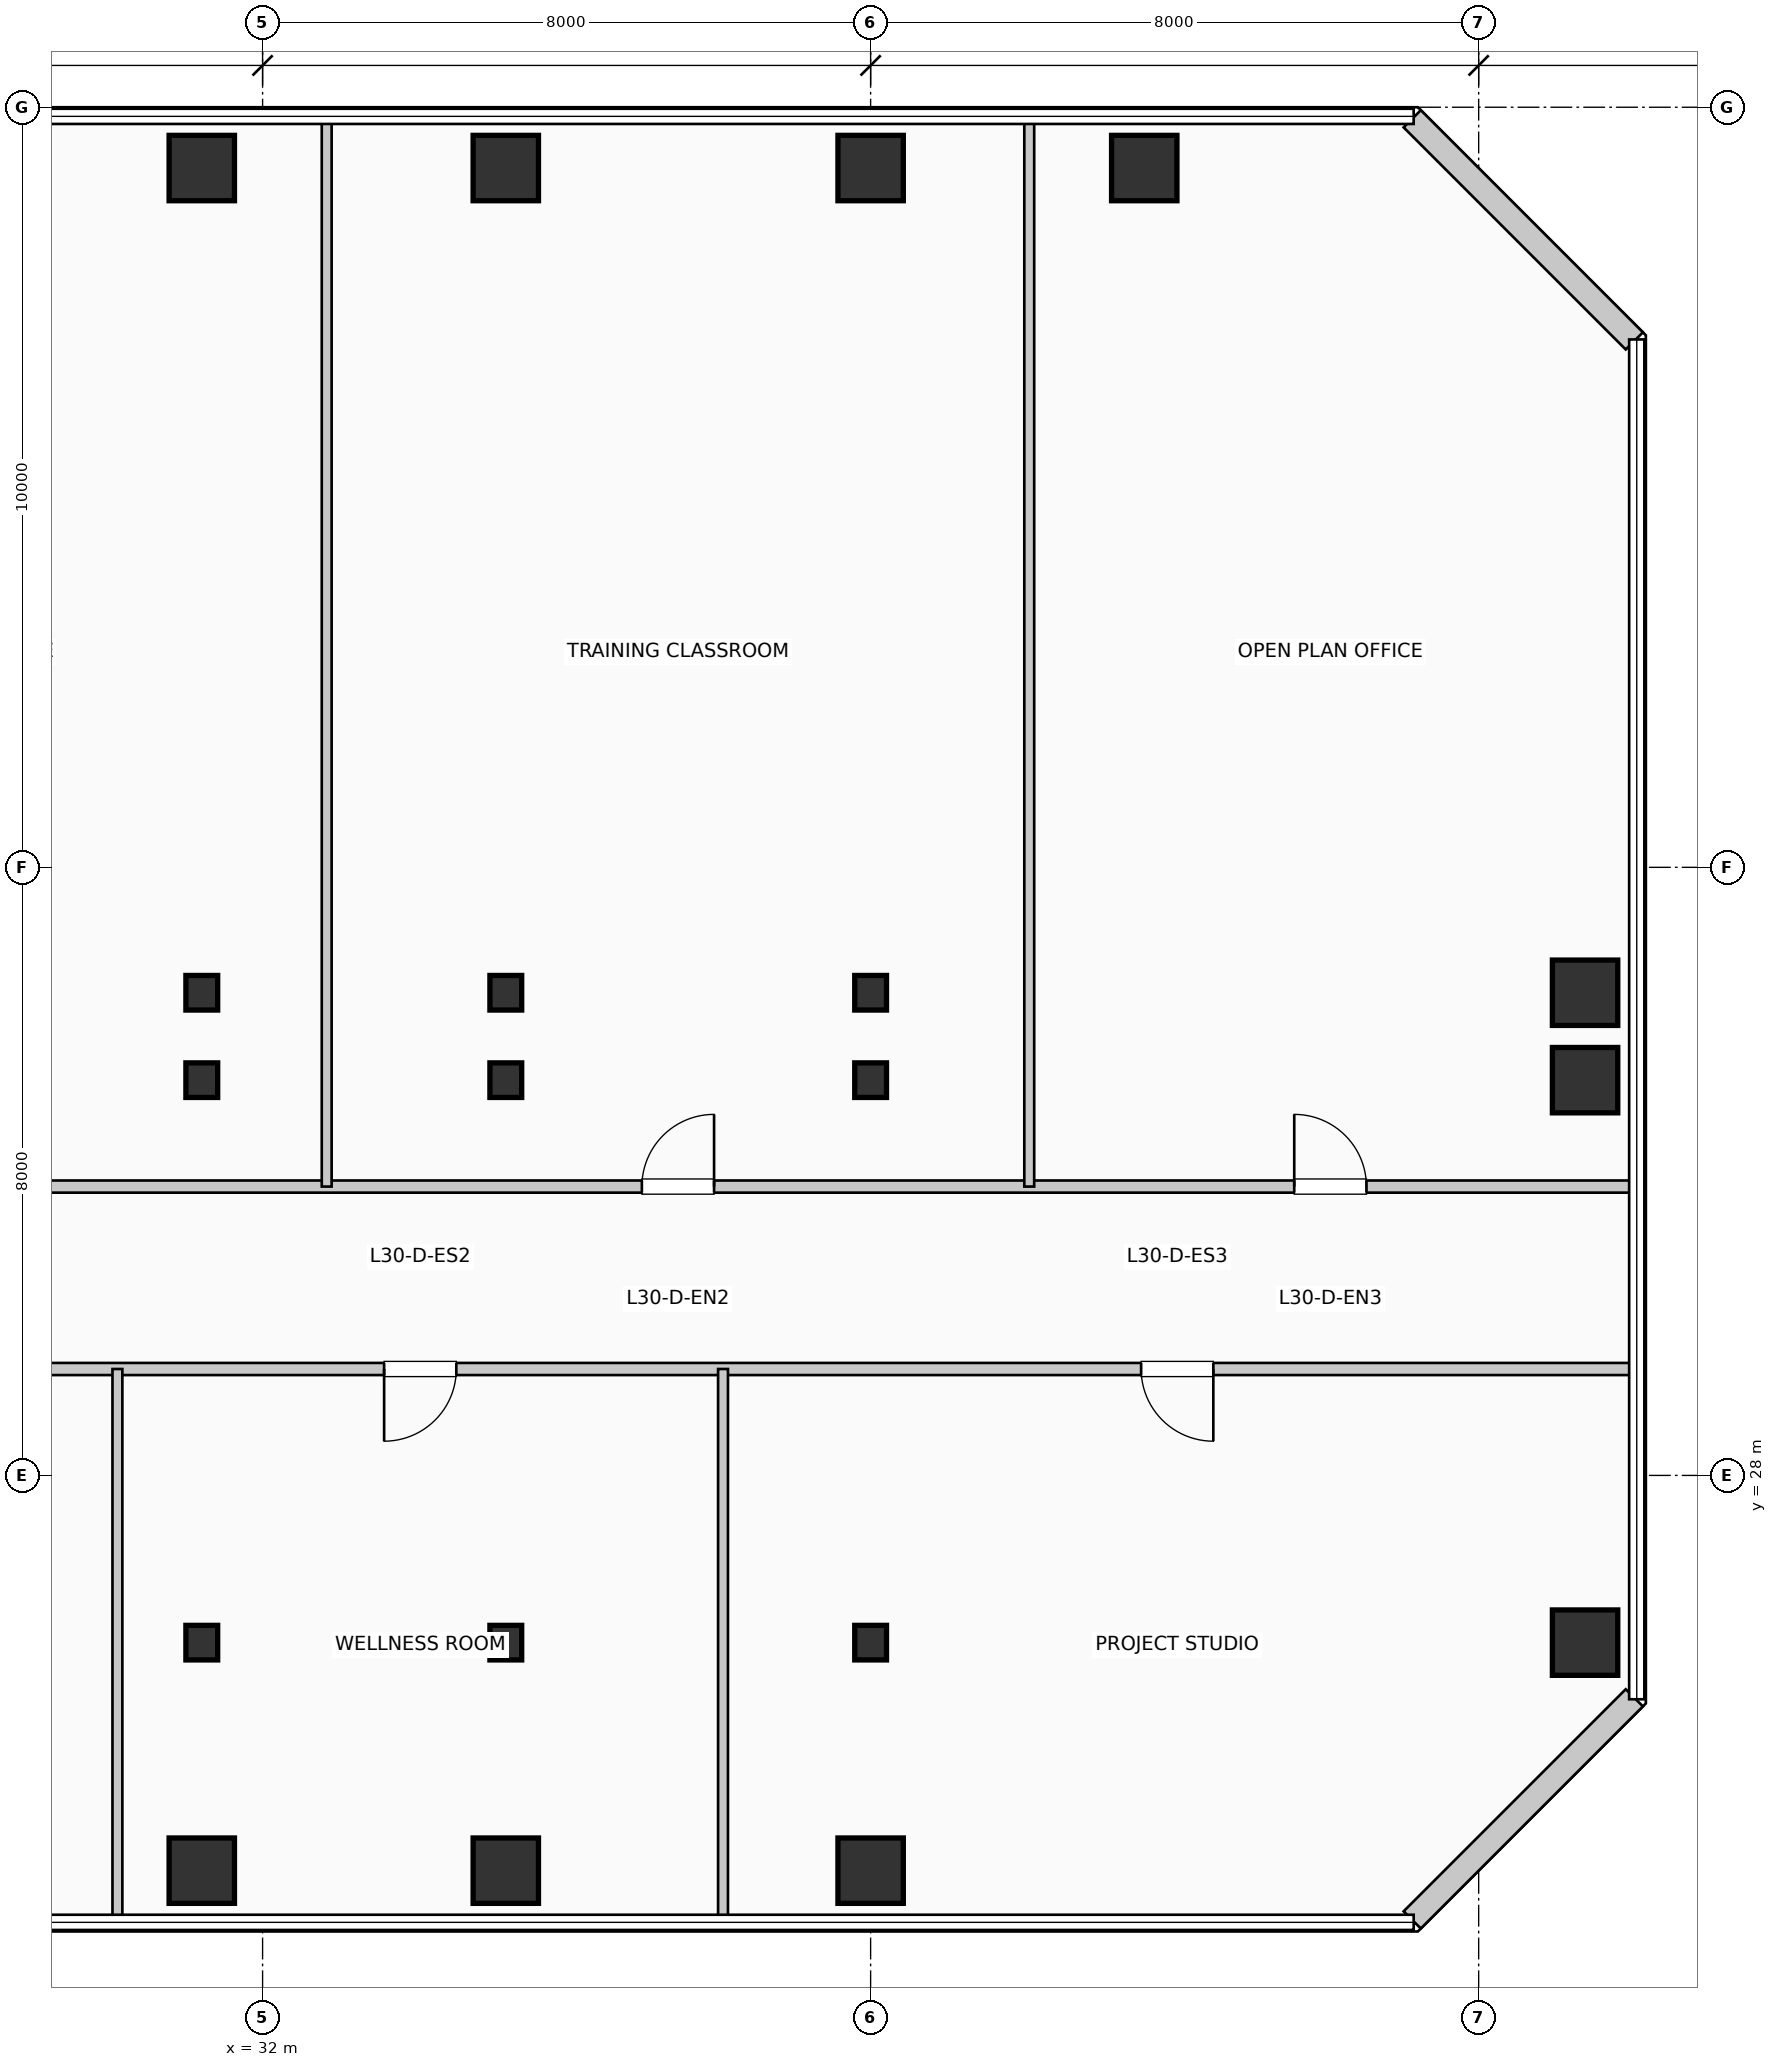
"""IFC4 building model, lengths in metres.
Left out: names, types, materials, properties, quantities, classifications, styles, units other than length and angle.
Written with IfcOpenShell. Run it as: python <this file> out.ifc"""

import sys

from ifc_helpers import new_model, si_unit, direction, frame, frame_2d, origin, origin_2d, place, context, subcontext, project, spatial, rectangle, i_section, extrude, element, fill, save


model = new_model("IFC4")
c1 = context("Model", 3, precision=1e-05, world=origin(), true_north=direction((0.0, 1.0)))
c2 = subcontext(c1, "Body", "Model", "MODEL_VIEW")
j1 = project(units=[si_unit("LENGTHUNIT", "METRE"), si_unit("PLANEANGLEUNIT", "RADIAN")], contexts=[c1])
p1 = place(None, origin())
s1 = spatial("IfcSite", under=j1, at=p1, CompositionType="ELEMENT")
p2 = place(p1, origin())
s2 = spatial("IfcBuilding", under=s1, at=p2, CompositionType="ELEMENT")
p3 = place(p2, frame((0.0, 0.0, 126.39)))
s3 = spatial("IfcBuildingStorey", under=s2, at=p3, CompositionType="ELEMENT", Elevation=126.39)
p4 = place(p3, frame((31.2, 22.8, 0.0), z_axis=(0.0, 0.0, 1.0), x_axis=(1.0, 0.0, 0.0)))
e1 = element("IfcColumn", 1, at=p4, inside=s3, PredefinedType="COLUMN", context=c2, shape_type="SweptSolid", body=[
    extrude(rectangle(XDim=0.86, YDim=0.86, at=origin_2d()), origin(), (0.0, 0.0, 1.0), 3.96),
])
for number, where, z_axis, x_axis in (
    (2, (31.2, 25.8, 0.0), (0.0, 0.0, 1.0), (1.0, 0.0, 0.0)),
    (3, (31.2, 33.2, 0.0), (0.0, 0.0, 1.0), (1.0, 0.0, 0.0)),
    (4, (31.2, 34.35, 0.0), (0.0, 0.0, 1.0), (1.0, 0.0, 0.0)),
):
    element("IfcColumn", number, at=place(p3, frame(where, z_axis=z_axis, x_axis=x_axis)), inside=s3, PredefinedType="COLUMN", context=c2, shape_type="SweptSolid", body=[
        extrude(i_section(OverallWidth=0.418, OverallDepth=0.455, WebThickness=0.032, FlangeThickness=0.051, at=origin_2d()), origin(), (0.0, 0.0, 1.0), 3.96),
    ])
for number, where, z_axis, x_axis in (
    (5, (31.2, 45.2, 0.0), (0.0, 0.0, 1.0), (1.0, 0.0, 0.0)),
    (6, (35.2, 22.8, 0.0), (0.0, 0.0, 1.0), (1.0, 0.0, 0.0)),
):
    element("IfcColumn", number, at=place(p3, frame(where, z_axis=z_axis, x_axis=x_axis)), inside=s3, PredefinedType="COLUMN", context=c2, shape_type="SweptSolid", body=[
        extrude(rectangle(XDim=0.86, YDim=0.86, at=origin_2d()), origin(), (0.0, 0.0, 1.0), 3.96),
    ])
for number, where, z_axis, x_axis in (
    (7, (35.2, 25.8, 0.0), (0.0, 0.0, 1.0), (1.0, 0.0, 0.0)),
    (8, (35.2, 33.2, 0.0), (0.0, 0.0, 1.0), (1.0, 0.0, 0.0)),
    (9, (35.2, 34.35, 0.0), (0.0, 0.0, 1.0), (1.0, 0.0, 0.0)),
):
    element("IfcColumn", number, at=place(p3, frame(where, z_axis=z_axis, x_axis=x_axis)), inside=s3, PredefinedType="COLUMN", context=c2, shape_type="SweptSolid", body=[
        extrude(i_section(OverallWidth=0.418, OverallDepth=0.455, WebThickness=0.032, FlangeThickness=0.051, at=origin_2d()), origin(), (0.0, 0.0, 1.0), 3.96),
    ])
for number, where, z_axis, x_axis in (
    (10, (35.2, 45.2, 0.0), (0.0, 0.0, 1.0), (1.0, 0.0, 0.0)),
    (11, (40.0, 22.8, 0.0), (0.0, 0.0, 1.0), (1.0, 0.0, 0.0)),
):
    element("IfcColumn", number, at=place(p3, frame(where, z_axis=z_axis, x_axis=x_axis)), inside=s3, PredefinedType="COLUMN", context=c2, shape_type="SweptSolid", body=[
        extrude(rectangle(XDim=0.86, YDim=0.86, at=origin_2d()), origin(), (0.0, 0.0, 1.0), 3.96),
    ])
for number, where, z_axis, x_axis in (
    (12, (40.0, 25.8, 0.0), (0.0, 0.0, 1.0), (1.0, 0.0, 0.0)),
    (13, (40.0, 33.2, 0.0), (0.0, 0.0, 1.0), (1.0, 0.0, 0.0)),
    (14, (40.0, 34.35, 0.0), (0.0, 0.0, 1.0), (1.0, 0.0, 0.0)),
):
    element("IfcColumn", number, at=place(p3, frame(where, z_axis=z_axis, x_axis=x_axis)), inside=s3, PredefinedType="COLUMN", context=c2, shape_type="SweptSolid", body=[
        extrude(i_section(OverallWidth=0.418, OverallDepth=0.455, WebThickness=0.032, FlangeThickness=0.051, at=origin_2d()), origin(), (0.0, 0.0, 1.0), 3.96),
    ])
for number, where, z_axis, x_axis in (
    (15, (40.0, 45.2, 0.0), (0.0, 0.0, 1.0), (1.0, 0.0, 0.0)),
    (16, (43.6, 45.2, 0.0), (0.0, 0.0, 1.0), (1.0, 0.0, 0.0)),
    (17, (49.4, 25.8, 0.0), (0.0, 0.0, 1.0), (1.0, 0.0, 0.0)),
    (18, (49.4, 33.2, 0.0), (0.0, 0.0, 1.0), (1.0, 0.0, 0.0)),
    (19, (49.4, 34.35, 0.0), (0.0, 0.0, 1.0), (1.0, 0.0, 0.0)),
):
    element("IfcColumn", number, at=place(p3, frame(where, z_axis=z_axis, x_axis=x_axis)), inside=s3, PredefinedType="COLUMN", context=c2, shape_type="SweptSolid", body=[
        extrude(rectangle(XDim=0.86, YDim=0.86, at=origin_2d()), origin(), (0.0, 0.0, 1.0), 3.96),
    ])
for number, where, z_axis, x_axis in (
    (20, (47.126, 22.152, 0.0), (0.0, 0.0, 1.0), (0.707, 0.707, 0.0)),
    (21, (50.048, 42.926, 0.0), (0.0, 0.0, 1.0), (-0.707, 0.707, 0.0)),
):
    element("IfcWall", number, at=place(p3, frame(where, z_axis=z_axis, x_axis=x_axis)), inside=s3, PredefinedType="SOLIDWALL", context=c2, shape_type="SweptSolid", body=[
        extrude(rectangle(XDim=4.133, YDim=0.32, at=frame_2d((2.066, 0.0))), origin(), (0.0, 0.0, 1.0), 3.71),
    ])
p5 = place(p3, frame((23.45, 29.4, 0.0), z_axis=(0.0, 0.0, 1.0), x_axis=(1.0, 0.0, 0.0)))
e22 = element("IfcWall", 22, at=p5, inside=s3, PredefinedType="PARTITIONING", context=c2, shape_type="SweptSolid", body=[
    extrude(rectangle(XDim=26.56, YDim=0.16, at=frame_2d((13.28, 0.0))), origin(), (0.0, 0.0, 1.0), 3.365),
])
p6 = place(p5, frame((3.795, 0.0, 0.0), z_axis=(0.0, 0.0, 1.0), x_axis=(-1.0, 0.0, 0.0)))
e23 = element("IfcOpeningElement", 23, at=p6, cuts=e22, PredefinedType="OPENING", context=c2, shape_type="SweptSolid", body=[
    extrude(rectangle(XDim=0.95, YDim=2.15, at=frame_2d((0.475, 1.075))), frame((0.0, 0.09, 0.0), z_axis=(0.0, -1.0, 0.0), x_axis=(1.0, 0.0, 0.0)), (0.0, 0.0, 1.0), 0.18),
])
p7 = place(p5, frame((11.099, 0.0, 0.0), z_axis=(0.0, 0.0, 1.0), x_axis=(-1.0, 0.0, 0.0)))
e24 = element("IfcOpeningElement", 24, at=p7, cuts=e22, PredefinedType="OPENING", context=c2, shape_type="SweptSolid", body=[
    extrude(rectangle(XDim=0.95, YDim=2.15, at=frame_2d((0.475, 1.075))), frame((0.0, 0.09, 0.0), z_axis=(0.0, -1.0, 0.0), x_axis=(1.0, 0.0, 0.0)), (0.0, 0.0, 1.0), 0.18),
])
p8 = place(p5, frame((21.059, 0.0, 0.0), z_axis=(0.0, 0.0, 1.0), x_axis=(-1.0, 0.0, 0.0)))
e25 = element("IfcOpeningElement", 25, at=p8, cuts=e22, PredefinedType="OPENING", context=c2, shape_type="SweptSolid", body=[
    extrude(rectangle(XDim=0.95, YDim=2.15, at=frame_2d((0.475, 1.075))), frame((0.0, 0.09, 0.0), z_axis=(0.0, -1.0, 0.0), x_axis=(1.0, 0.0, 0.0)), (0.0, 0.0, 1.0), 0.18),
])
p9 = place(p3, frame((23.6, 31.8, 0.0), z_axis=(0.0, 0.0, 1.0), x_axis=(1.0, 0.0, 0.0)))
e26 = element("IfcWall", 26, at=p9, inside=s3, PredefinedType="PARTITIONING", context=c2, shape_type="SweptSolid", body=[
    extrude(rectangle(XDim=26.41, YDim=0.16, at=frame_2d((13.205, 0.0))), origin(), (0.0, 0.0, 1.0), 3.71),
])
p10 = place(p9, frame((4.147, 0.0, 0.0)))
e27 = element("IfcOpeningElement", 27, at=p10, cuts=e26, PredefinedType="OPENING", context=c2, shape_type="SweptSolid", body=[
    extrude(rectangle(XDim=0.95, YDim=2.15, at=frame_2d((0.475, 1.075))), frame((0.0, 0.09, 0.0), z_axis=(0.0, -1.0, 0.0), x_axis=(1.0, 0.0, 0.0)), (0.0, 0.0, 1.0), 0.18),
])
p11 = place(p9, frame((13.39, 0.0, 0.0)))
e28 = element("IfcOpeningElement", 28, at=p11, cuts=e26, PredefinedType="OPENING", context=c2, shape_type="SweptSolid", body=[
    extrude(rectangle(XDim=0.95, YDim=2.15, at=frame_2d((0.475, 1.075))), frame((0.0, 0.09, 0.0), z_axis=(0.0, -1.0, 0.0), x_axis=(1.0, 0.0, 0.0)), (0.0, 0.0, 1.0), 0.18),
])
p12 = place(p9, frame((21.973, 0.0, 0.0)))
e29 = element("IfcOpeningElement", 29, at=p12, cuts=e26, PredefinedType="OPENING", context=c2, shape_type="SweptSolid", body=[
    extrude(rectangle(XDim=0.95, YDim=2.15, at=frame_2d((0.475, 1.075))), frame((0.0, 0.09, 0.0), z_axis=(0.0, -1.0, 0.0), x_axis=(1.0, 0.0, 0.0)), (0.0, 0.0, 1.0), 0.18),
])
for number, where, z_axis, x_axis in (
    (30, (30.09, 22.19, 0.0), (0.0, 0.0, 1.0), (0.0, 1.0, 0.0)),
    (31, (38.058, 22.19, 0.0), (0.0, 0.0, 1.0), (0.0, 1.0, 0.0)),
):
    element("IfcWall", number, at=place(p3, frame(where, z_axis=z_axis, x_axis=x_axis)), inside=s3, PredefinedType="PARTITIONING", context=c2, shape_type="SweptSolid", body=[
        extrude(rectangle(XDim=7.21, YDim=0.13, at=frame_2d((3.605, 0.0))), origin(), (0.0, 0.0, 1.0), 3.71),
    ])
for number, where, z_axis, x_axis in (
    (32, (32.844, 31.8, 0.0), (0.0, 0.0, 1.0), (0.0, 1.0, 0.0)),
    (33, (42.087, 31.8, 0.0), (0.0, 0.0, 1.0), (0.0, 1.0, 0.0)),
):
    element("IfcWall", number, at=place(p3, frame(where, z_axis=z_axis, x_axis=x_axis)), inside=s3, PredefinedType="PARTITIONING", context=c2, shape_type="SweptSolid", body=[
        extrude(rectangle(XDim=14.01, YDim=0.13, at=frame_2d((7.005, 0.0))), origin(), (0.0, 0.0, 1.0), 3.71),
    ])
p13 = place(p7, origin())
e34 = element("IfcDoor", 34, at=p13, inside=s3, OperationType="SINGLE_SWING_LEFT", PredefinedType="DOOR", context=c2, shape_type="SweptSolid", body=[
    extrude(rectangle(XDim=0.95, YDim=2.15, at=frame_2d((0.475, 1.075))), frame((0.0, 0.025, 0.0), z_axis=(0.0, -1.0, 0.0), x_axis=(1.0, 0.0, 0.0)), (0.0, 0.0, 1.0), 0.05),
])
fill(e24, e34)
p14 = place(p8, origin())
e35 = element("IfcDoor", 35, at=p14, inside=s3, OperationType="SINGLE_SWING_RIGHT", PredefinedType="DOOR", context=c2, shape_type="SweptSolid", body=[
    extrude(rectangle(XDim=0.95, YDim=2.15, at=frame_2d((0.475, 1.075))), frame((0.0, 0.025, 0.0), z_axis=(0.0, -1.0, 0.0), x_axis=(1.0, 0.0, 0.0)), (0.0, 0.0, 1.0), 0.05),
])
fill(e25, e35)
p15 = place(p11, origin())
e36 = element("IfcDoor", 36, at=p15, inside=s3, OperationType="SINGLE_SWING_RIGHT", PredefinedType="DOOR", context=c2, shape_type="SweptSolid", body=[
    extrude(rectangle(XDim=0.95, YDim=2.15, at=frame_2d((0.475, 1.075))), frame((0.0, 0.025, 0.0), z_axis=(0.0, -1.0, 0.0), x_axis=(1.0, 0.0, 0.0)), (0.0, 0.0, 1.0), 0.05),
])
fill(e28, e36)
p16 = place(p12, origin())
e37 = element("IfcDoor", 37, at=p16, inside=s3, OperationType="SINGLE_SWING_LEFT", PredefinedType="DOOR", context=c2, shape_type="SweptSolid", body=[
    extrude(rectangle(XDim=0.95, YDim=2.15, at=frame_2d((0.475, 1.075))), frame((0.0, 0.025, 0.0), z_axis=(0.0, -1.0, 0.0), x_axis=(1.0, 0.0, 0.0)), (0.0, 0.0, 1.0), 0.05),
])
fill(e29, e37)
save(model, sys.argv[1])
